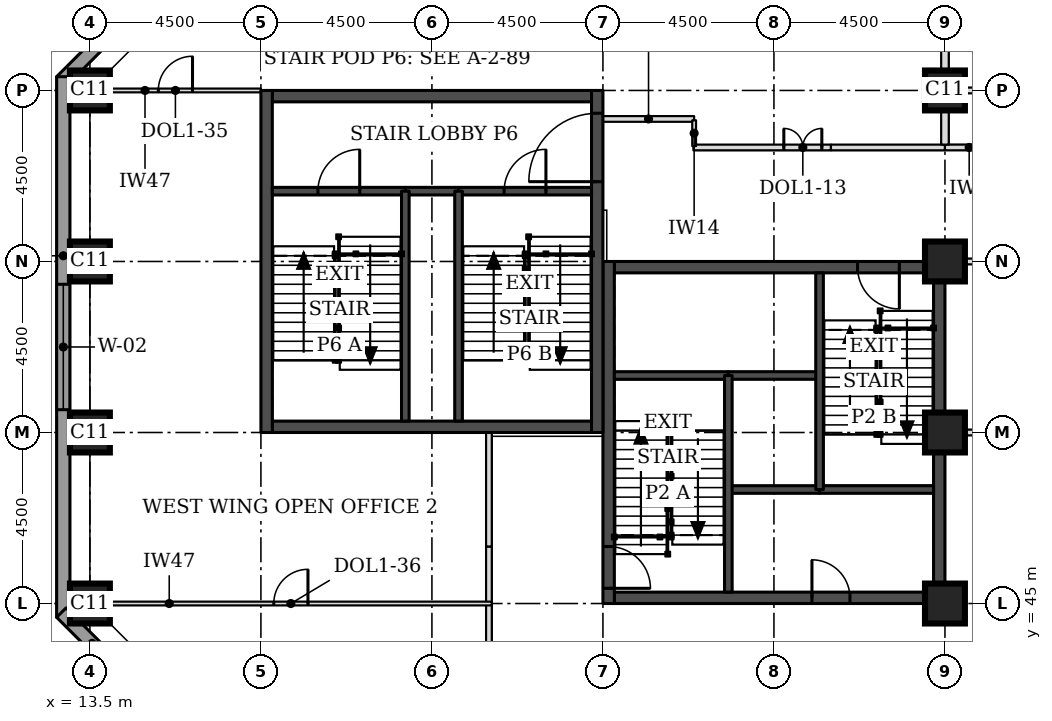
"""IFC4 building model, lengths in metres.
Left out: names, types, materials, properties, quantities, classifications, styles, units other than length and angle.
Written with IfcOpenShell. Run it as: python <this file> out.ifc"""

import sys

from ifc_helpers import new_model, si_unit, direction, frame, frame_2d, origin, origin_2d, place, context, subcontext, project, spatial, rectangle, extrude, element, fill, save


model = new_model("IFC4")
c1 = context("Model", 3, precision=1e-05, world=origin(), true_north=direction((0.0, 1.0)))
c2 = subcontext(c1, "Body", "Model", "MODEL_VIEW")
j1 = project(units=[si_unit("LENGTHUNIT", "METRE"), si_unit("PLANEANGLEUNIT", "RADIAN")], contexts=[c1])
p1 = place(None, origin())
s1 = spatial("IfcSite", under=j1, at=p1, CompositionType="ELEMENT")
p2 = place(p1, origin())
s2 = spatial("IfcBuilding", under=s1, at=p2, CompositionType="ELEMENT")
p3 = place(p2, frame((0.0, 0.0, 82.6)))
s3 = spatial("IfcBuildingStorey", under=s2, at=p3, CompositionType="ELEMENT", Elevation=82.6)
for number, where, z_axis, x_axis in (
    (1, (13.5, 45.0, 0.0), (0.0, 0.0, 1.0), (1.0, 0.0, 0.0)),
    (2, (36.0, 45.0, 0.0), (0.0, 0.0, 1.0), (1.0, 0.0, 0.0)),
    (3, (13.5, 49.5, 0.0), (0.0, 0.0, 1.0), (1.0, 0.0, 0.0)),
    (4, (36.0, 49.5, 0.0), (0.0, 0.0, 1.0), (1.0, 0.0, 0.0)),
    (5, (13.5, 54.0, 0.0), (0.0, 0.0, 1.0), (1.0, 0.0, 0.0)),
    (6, (36.0, 54.0, 0.0), (0.0, 0.0, 1.0), (1.0, 0.0, 0.0)),
    (7, (13.5, 58.5, 0.0), (0.0, 0.0, 1.0), (1.0, 0.0, 0.0)),
    (8, (36.0, 58.5, 0.0), (0.0, 0.0, 1.0), (1.0, 0.0, 0.0)),
):
    element("IfcColumn", number, at=place(p3, frame(where, z_axis=z_axis, x_axis=x_axis)), inside=s3, PredefinedType="COLUMN", context=c2, shape_type="SweptSolid", body=[
        extrude(rectangle(XDim=1.05, YDim=1.05, at=origin_2d()), origin(), (0.0, 0.0, 1.0), 3.7),
    ])
p4 = place(p3, frame((27.3, 45.15, 0.0), z_axis=(0.0, 0.0, 1.0), x_axis=(1.0, 0.0, 0.0)))
e9 = element("IfcWall", 9, at=p4, inside=s3, PredefinedType="SHEAR", context=c2, shape_type="SweptSolid", body=[
    extrude(rectangle(XDim=8.4, YDim=0.3, at=frame_2d((4.2, 0.0))), origin(), (0.0, 0.0, 1.0), 3.7),
])
p5 = place(p4, frame((5.2, 0.0, 0.0)))
e10 = element("IfcOpeningElement", 10, at=p5, cuts=e9, PredefinedType="OPENING", context=c2, shape_type="SweptSolid", body=[
    extrude(rectangle(XDim=1.0, YDim=2.1, at=frame_2d((0.5, 1.05))), frame((0.0, 0.16, 0.0), z_axis=(0.0, -1.0, 0.0), x_axis=(1.0, 0.0, 0.0)), (0.0, 0.0, 1.0), 0.32),
])
p6 = place(p3, frame((27.3, 53.85, 0.0), z_axis=(0.0, 0.0, 1.0), x_axis=(1.0, 0.0, 0.0)))
e11 = element("IfcWall", 11, at=p6, inside=s3, PredefinedType="SHEAR", context=c2, shape_type="SweptSolid", body=[
    extrude(rectangle(XDim=8.4, YDim=0.3, at=frame_2d((4.2, 0.0))), origin(), (0.0, 0.0, 1.0), 3.7),
])
p7 = place(p6, frame((6.4, 0.0, 0.0)))
e12 = element("IfcOpeningElement", 12, at=p7, cuts=e11, PredefinedType="OPENING", context=c2, shape_type="SweptSolid", body=[
    extrude(rectangle(XDim=1.1, YDim=2.1, at=frame_2d((0.55, 1.05))), frame((0.0, 0.16, 0.0), z_axis=(0.0, -1.0, 0.0), x_axis=(1.0, 0.0, 0.0)), (0.0, 0.0, 1.0), 0.32),
])
p8 = place(p3, frame((27.15, 45.0, 0.0), z_axis=(0.0, 0.0, 1.0), x_axis=(0.0, 1.0, 0.0)))
e13 = element("IfcWall", 13, at=p8, inside=s3, PredefinedType="SHEAR", context=c2, shape_type="SweptSolid", body=[
    extrude(rectangle(XDim=9.0, YDim=0.3, at=frame_2d((4.5, 0.0))), origin(), (0.0, 0.0, 1.0), 3.7),
])
p9 = place(p8, frame((0.4, 0.0, 0.0)))
e14 = element("IfcOpeningElement", 14, at=p9, cuts=e13, PredefinedType="OPENING", context=c2, shape_type="SweptSolid", body=[
    extrude(rectangle(XDim=1.1, YDim=2.1, at=frame_2d((0.55, 1.05))), frame((0.0, 0.16, 0.0), z_axis=(0.0, -1.0, 0.0), x_axis=(1.0, 0.0, 0.0)), (0.0, 0.0, 1.0), 0.32),
])
p10 = place(p3, frame((35.85, 45.0, 0.0), z_axis=(0.0, 0.0, 1.0), x_axis=(0.0, 1.0, 0.0)))
e15 = element("IfcWall", 15, at=p10, inside=s3, PredefinedType="SHEAR", context=c2, shape_type="SweptSolid", body=[
    extrude(rectangle(XDim=9.0, YDim=0.3, at=frame_2d((4.5, 0.0))), origin(), (0.0, 0.0, 1.0), 3.7),
])
for number, where, z_axis, x_axis in (
    (16, (18.3, 49.65, 0.0), (0.0, 0.0, 1.0), (1.0, 0.0, 0.0)),
    (17, (18.3, 58.35, 0.0), (0.0, 0.0, 1.0), (1.0, 0.0, 0.0)),
):
    element("IfcWall", number, at=place(p3, frame(where, z_axis=z_axis, x_axis=x_axis)), inside=s3, PredefinedType="SHEAR", context=c2, shape_type="SweptSolid", body=[
        extrude(rectangle(XDim=8.4, YDim=0.3, at=frame_2d((4.2, 0.0))), origin(), (0.0, 0.0, 1.0), 3.7),
    ])
p11 = place(p3, frame((18.15, 49.5, 0.0), z_axis=(0.0, 0.0, 1.0), x_axis=(0.0, 1.0, 0.0)))
e18 = element("IfcWall", 18, at=p11, inside=s3, PredefinedType="SHEAR", context=c2, shape_type="SweptSolid", body=[
    extrude(rectangle(XDim=9.0, YDim=0.3, at=frame_2d((4.5, 0.0))), origin(), (0.0, 0.0, 1.0), 3.7),
])
p12 = place(p3, frame((26.85, 49.5, 0.0), z_axis=(0.0, 0.0, 1.0), x_axis=(0.0, 1.0, 0.0)))
e19 = element("IfcWall", 19, at=p12, inside=s3, PredefinedType="SHEAR", context=c2, shape_type="SweptSolid", body=[
    extrude(rectangle(XDim=9.0, YDim=0.3, at=frame_2d((4.5, 0.0))), origin(), (0.0, 0.0, 1.0), 3.7),
])
p13 = place(p12, frame((6.6, 0.0, 0.0)))
e20 = element("IfcOpeningElement", 20, at=p13, cuts=e19, PredefinedType="OPENING", context=c2, shape_type="SweptSolid", body=[
    extrude(rectangle(XDim=1.8, YDim=2.1, at=frame_2d((0.9, 1.05))), frame((0.0, 0.16, 0.0), z_axis=(0.0, -1.0, 0.0), x_axis=(1.0, 0.0, 0.0)), (0.0, 0.0, 1.0), 0.32),
])
p14 = place(p3, frame((17.761, 63.751, 0.0), z_axis=(0.0, 0.0, 1.0), x_axis=(-0.707106781187, -0.707106781187, 0.0)))
e21 = element("IfcWall", 21, at=p14, inside=s3, PredefinedType="STANDARD", context=c2, shape_type="SweptSolid", body=[
    extrude(rectangle(XDim=7.089, YDim=0.35, at=frame_2d((3.544, 0.0))), origin(), (0.0, 0.0, 1.0), 3.525),
])
p15 = place(p14, frame((1.894, 0.0, 0.9)))
e22 = element("IfcOpeningElement", 22, at=p15, cuts=e21, PredefinedType="OPENING", context=c2, shape_type="SweptSolid", body=[
    extrude(rectangle(XDim=3.3, YDim=1.9, at=frame_2d((1.65, 0.95))), frame((0.0, 0.185, 0.0), z_axis=(0.0, -1.0, 0.0), x_axis=(1.0, 0.0, 0.0)), (0.0, 0.0, 1.0), 0.37),
])
p16 = place(p3, frame((12.8, 58.862, 0.0), z_axis=(0.0, 0.0, 1.0), x_axis=(0.0, -1.0, 0.0)))
e23 = element("IfcWall", 23, at=p16, inside=s3, PredefinedType="STANDARD", context=c2, shape_type="SweptSolid", body=[
    extrude(rectangle(XDim=14.225, YDim=0.35, at=frame_2d((7.112, 0.0))), origin(), (0.0, 0.0, 1.0), 3.525),
])
p17 = place(p16, frame((5.462, 0.0, 0.9)))
e24 = element("IfcOpeningElement", 24, at=p17, cuts=e23, PredefinedType="OPENING", context=c2, shape_type="SweptSolid", body=[
    extrude(rectangle(XDim=3.3, YDim=1.9, at=frame_2d((1.65, 0.95))), frame((0.0, 0.185, 0.0), z_axis=(0.0, -1.0, 0.0), x_axis=(1.0, 0.0, 0.0)), (0.0, 0.0, 1.0), 0.37),
])
p18 = place(p3, frame((12.749, 44.761, 0.0), z_axis=(0.0, 0.0, 1.0), x_axis=(0.707106781187, -0.707106781187, 0.0)))
e25 = element("IfcWall", 25, at=p18, inside=s3, PredefinedType="STANDARD", context=c2, shape_type="SweptSolid", body=[
    extrude(rectangle(XDim=7.089, YDim=0.35, at=frame_2d((3.544, 0.0))), origin(), (0.0, 0.0, 1.0), 3.525),
])
p19 = place(p18, frame((1.894, 0.0, 0.9)))
e26 = element("IfcOpeningElement", 26, at=p19, cuts=e25, PredefinedType="OPENING", context=c2, shape_type="SweptSolid", body=[
    extrude(rectangle(XDim=3.3, YDim=1.9, at=frame_2d((1.65, 0.95))), frame((0.0, 0.185, 0.0), z_axis=(0.0, -1.0, 0.0), x_axis=(1.0, 0.0, 0.0)), (0.0, 0.0, 1.0), 0.37),
])
for number, where, z_axis, x_axis in (
    (27, (36.525, 49.5, 0.0), (0.0, 0.0, 1.0), (1.0, 0.0, 0.0)),
    (28, (36.525, 54.0, 0.0), (0.0, 0.0, 1.0), (1.0, 0.0, 0.0)),
):
    element("IfcWall", number, at=place(p3, frame(where, z_axis=z_axis, x_axis=x_axis)), inside=s3, PredefinedType="PARTITIONING", context=c2, shape_type="SweptSolid", body=[
        extrude(rectangle(XDim=5.55, YDim=0.15, at=frame_2d((2.775, 0.0))), origin(), (0.0, 0.0, 1.0), 3.55),
    ])
p20 = place(p3, frame((29.38, 57.0, 0.0), z_axis=(0.0, 0.0, 1.0), x_axis=(1.0, 0.0, 0.0)))
e29 = element("IfcWall", 29, at=p20, inside=s3, PredefinedType="PARTITIONING", context=c2, shape_type="SweptSolid", body=[
    extrude(rectangle(XDim=3.62, YDim=0.15, at=frame_2d((1.81, 0.0))), origin(), (0.0, 0.0, 1.0), 3.55),
])
p21 = place(p20, frame((2.38, 0.0, 0.0)))
e30 = element("IfcOpeningElement", 30, at=p21, cuts=e29, PredefinedType="OPENING", context=c2, shape_type="SweptSolid", body=[
    extrude(rectangle(XDim=1.0, YDim=2.1, at=frame_2d((0.5, 1.05))), frame((0.0, 0.085, 0.0), z_axis=(0.0, -1.0, 0.0), x_axis=(1.0, 0.0, 0.0)), (0.0, 0.0, 1.0), 0.17),
])
p22 = place(p3, frame((33.0, 57.0, 0.0), z_axis=(0.0, 0.0, 1.0), x_axis=(1.0, 0.0, 0.0)))
e31 = element("IfcWall", 31, at=p22, inside=s3, PredefinedType="PARTITIONING", context=c2, shape_type="SweptSolid", body=[
    extrude(rectangle(XDim=3.0, YDim=0.15, at=frame_2d((1.5, 0.0))), origin(), (0.0, 0.0, 1.0), 3.55),
])
p23 = place(p3, frame((36.0, 57.0, 0.0), z_axis=(0.0, 0.0, 1.0), x_axis=(1.0, 0.0, 0.0)))
e32 = element("IfcWall", 32, at=p23, inside=s3, PredefinedType="PARTITIONING", context=c2, shape_type="SweptSolid", body=[
    extrude(rectangle(XDim=6.075, YDim=0.15, at=frame_2d((3.038, 0.0))), origin(), (0.0, 0.0, 1.0), 3.55),
])
p24 = place(p3, frame((36.525, 58.5, 0.0), z_axis=(0.0, 0.0, 1.0), x_axis=(1.0, 0.0, 0.0)))
e33 = element("IfcWall", 33, at=p24, inside=s3, PredefinedType="PARTITIONING", context=c2, shape_type="SweptSolid", body=[
    extrude(rectangle(XDim=2.55, YDim=0.15, at=frame_2d((1.275, 0.0))), origin(), (0.0, 0.0, 1.0), 3.55),
])
p25 = place(p3, frame((24.0, 39.975, 0.0), z_axis=(0.0, 0.0, 1.0), x_axis=(0.0, 1.0, 0.0)))
e34 = element("IfcWall", 34, at=p25, inside=s3, PredefinedType="PARTITIONING", context=c2, shape_type="SweptSolid", body=[
    extrude(rectangle(XDim=5.025, YDim=0.15, at=frame_2d((2.512, 0.0))), origin(), (0.0, 0.0, 1.0), 3.55),
])
p26 = place(p3, frame((24.0, 45.0, 0.0), z_axis=(0.0, 0.0, 1.0), x_axis=(0.0, 1.0, 0.0)))
e35 = element("IfcWall", 35, at=p26, inside=s3, PredefinedType="PARTITIONING", context=c2, shape_type="SweptSolid", body=[
    extrude(rectangle(XDim=1.5, YDim=0.15, at=frame_2d((0.75, 0.0))), origin(), (0.0, 0.0, 1.0), 3.55),
])
p27 = place(p3, frame((24.0, 46.5, 0.0), z_axis=(0.0, 0.0, 1.0), x_axis=(0.0, 1.0, 0.0)))
e36 = element("IfcWall", 36, at=p27, inside=s3, PredefinedType="PARTITIONING", context=c2, shape_type="SweptSolid", body=[
    extrude(rectangle(XDim=3.0, YDim=0.15, at=frame_2d((1.5, 0.0))), origin(), (0.0, 0.0, 1.0), 3.55),
])
p28 = place(p3, frame((36.0, 57.075, 0.0), z_axis=(0.0, 0.0, 1.0), x_axis=(0.0, 1.0, 0.0)))
e37 = element("IfcWall", 37, at=p28, inside=s3, PredefinedType="PARTITIONING", context=c2, shape_type="SweptSolid", body=[
    extrude(rectangle(XDim=0.9, YDim=0.2, at=frame_2d((0.45, 0.0))), origin(), (0.0, 0.0, 1.0), 2.8),
])
p29 = place(p3, frame((36.0, 58.995, 0.0), z_axis=(0.0, 0.0, 1.0), x_axis=(0.0, 1.0, 0.0)))
e38 = element("IfcWall", 38, at=p29, inside=s3, PredefinedType="PARTITIONING", context=c2, shape_type="SweptSolid", body=[
    extrude(rectangle(XDim=1.005, YDim=0.2, at=frame_2d((0.502, 0.0))), origin(), (0.0, 0.0, 1.0), 2.8),
])
p30 = place(p3, frame((13.5, 58.5, 0.0), z_axis=(0.0, 0.0, 1.0), x_axis=(1.0, 0.0, 0.0)))
e39 = element("IfcWall", 39, at=p30, inside=s3, PredefinedType="PARTITIONING", context=c2, shape_type="SweptSolid", body=[
    extrude(rectangle(XDim=4.5, YDim=0.1, at=frame_2d((2.25, 0.0))), origin(), (0.0, 0.0, 1.0), 2.55),
])
p31 = place(p30, frame((1.8, 0.0, 0.0)))
e40 = element("IfcOpeningElement", 40, at=p31, cuts=e39, PredefinedType="OPENING", context=c2, shape_type="SweptSolid", body=[
    extrude(rectangle(XDim=0.9, YDim=2.1, at=frame_2d((0.45, 1.05))), frame((0.0, 0.06, 0.0), z_axis=(0.0, -1.0, 0.0), x_axis=(1.0, 0.0, 0.0)), (0.0, 0.0, 1.0), 0.12),
])
p32 = place(p3, frame((24.075, 45.0, 0.0), z_axis=(0.0, 0.0, 1.0), x_axis=(-1.0, 0.0, 0.0)))
e41 = element("IfcWall", 41, at=p32, inside=s3, PredefinedType="PARTITIONING", context=c2, shape_type="SweptSolid", body=[
    extrude(rectangle(XDim=10.575, YDim=0.1, at=frame_2d((5.288, 0.0))), origin(), (0.0, 0.0, 1.0), 2.55),
])
p33 = place(p32, frame((4.837, 0.0, 0.0)))
e42 = element("IfcOpeningElement", 42, at=p33, cuts=e41, PredefinedType="OPENING", context=c2, shape_type="SweptSolid", body=[
    extrude(rectangle(XDim=0.9, YDim=2.1, at=frame_2d((0.45, 1.05))), frame((0.0, 0.06, 0.0), z_axis=(0.0, -1.0, 0.0), x_axis=(1.0, 0.0, 0.0)), (0.0, 0.0, 1.0), 0.12),
])
p34 = place(p3, frame((27.0, 57.75, 0.0), z_axis=(0.0, 0.0, 1.0), x_axis=(1.0, 0.0, 0.0)))
e43 = element("IfcWall", 43, at=p34, inside=s3, PredefinedType="PARTITIONING", context=c2, shape_type="SweptSolid", body=[
    extrude(rectangle(XDim=2.4, YDim=0.15, at=frame_2d((1.2, 0.0))), origin(), (0.0, 0.0, 1.0), 3.55),
])
p35 = place(p3, frame((29.4, 57.715, 0.0), z_axis=(0.0, 0.0, 1.0), x_axis=(0.0, -1.0, 0.0)))
e44 = element("IfcWall", 44, at=p35, inside=s3, PredefinedType="PARTITIONING", context=c2, shape_type="SweptSolid", body=[
    extrude(rectangle(XDim=0.68, YDim=0.1, at=frame_2d((0.34, 0.0))), origin(), (0.0, 0.0, 1.0), 3.55),
])
p36 = place(p3, frame((30.3, 48.0, 0.0), z_axis=(0.0, 0.0, 1.0), x_axis=(1.0, 0.0, 0.0)))
e45 = element("IfcWall", 45, at=p36, inside=s3, PredefinedType="SOLIDWALL", context=c2, shape_type="SweptSolid", body=[
    extrude(rectangle(XDim=2.4, YDim=0.2, at=frame_2d((1.2, 0.0))), origin(), (0.0, 0.0, 1.0), 3.55),
])
p37 = place(p3, frame((32.7, 48.0, 0.0), z_axis=(0.0, 0.0, 1.0), x_axis=(1.0, 0.0, 0.0)))
e46 = element("IfcWall", 46, at=p37, inside=s3, PredefinedType="SOLIDWALL", context=c2, shape_type="SweptSolid", body=[
    extrude(rectangle(XDim=3.0, YDim=0.2, at=frame_2d((1.5, 0.0))), origin(), (0.0, 0.0, 1.0), 3.55),
])
p38 = place(p3, frame((30.3, 51.0, 0.0), z_axis=(0.0, 0.0, 1.0), x_axis=(1.0, 0.0, 0.0)))
e47 = element("IfcWall", 47, at=p38, inside=s3, PredefinedType="SOLIDWALL", context=c2, shape_type="SweptSolid", body=[
    extrude(rectangle(XDim=2.4, YDim=0.2, at=frame_2d((1.2, 0.0))), origin(), (0.0, 0.0, 1.0), 3.7),
])
p39 = place(p3, frame((27.3, 51.0, 0.0), z_axis=(0.0, 0.0, 1.0), x_axis=(1.0, 0.0, 0.0)))
e48 = element("IfcWall", 48, at=p39, inside=s3, PredefinedType="SOLIDWALL", context=c2, shape_type="SweptSolid", body=[
    extrude(rectangle(XDim=3.0, YDim=0.2, at=frame_2d((1.5, 0.0))), origin(), (0.0, 0.0, 1.0), 3.55),
])
for number, where, z_axis, x_axis in (
    (49, (30.3, 45.3, 0.0), (0.0, 0.0, 1.0), (0.0, 1.0, 0.0)),
    (50, (32.7, 48.0, 0.0), (0.0, 0.0, 1.0), (0.0, 1.0, 0.0)),
):
    element("IfcWall", number, at=place(p3, frame(where, z_axis=z_axis, x_axis=x_axis)), inside=s3, PredefinedType="SOLIDWALL", context=c2, shape_type="SweptSolid", body=[
        extrude(rectangle(XDim=5.7, YDim=0.2, at=frame_2d((2.85, 0.0))), origin(), (0.0, 0.0, 1.0), 3.55),
    ])
p40 = place(p3, frame((21.8, 55.85, 0.0), z_axis=(0.0, 0.0, 1.0), x_axis=(1.0, 0.0, 0.0)))
e51 = element("IfcWall", 51, at=p40, inside=s3, PredefinedType="SOLIDWALL", context=c2, shape_type="SweptSolid", body=[
    extrude(rectangle(XDim=1.4, YDim=0.2, at=frame_2d((0.7, 0.0))), origin(), (0.0, 0.0, 1.0), 3.55),
])
p41 = place(p3, frame((18.3, 55.85, 0.0), z_axis=(0.0, 0.0, 1.0), x_axis=(1.0, 0.0, 0.0)))
e52 = element("IfcWall", 52, at=p41, inside=s3, PredefinedType="SOLIDWALL", context=c2, shape_type="SweptSolid", body=[
    extrude(rectangle(XDim=3.5, YDim=0.2, at=frame_2d((1.75, 0.0))), origin(), (0.0, 0.0, 1.0), 3.55),
])
p42 = place(p41, frame((1.2, 0.0, 0.0)))
e53 = element("IfcOpeningElement", 53, at=p42, cuts=e52, PredefinedType="OPENING", context=c2, shape_type="SweptSolid", body=[
    extrude(rectangle(XDim=1.1, YDim=2.1, at=frame_2d((0.55, 1.05))), frame((0.0, 0.11, 0.0), z_axis=(0.0, -1.0, 0.0), x_axis=(1.0, 0.0, 0.0)), (0.0, 0.0, 1.0), 0.22),
])
p43 = place(p3, frame((23.2, 55.85, 0.0), z_axis=(0.0, 0.0, 1.0), x_axis=(1.0, 0.0, 0.0)))
e54 = element("IfcWall", 54, at=p43, inside=s3, PredefinedType="SOLIDWALL", context=c2, shape_type="SweptSolid", body=[
    extrude(rectangle(XDim=3.5, YDim=0.2, at=frame_2d((1.75, 0.0))), origin(), (0.0, 0.0, 1.0), 3.55),
])
p44 = place(p43, frame((1.2, 0.0, 0.0)))
e55 = element("IfcOpeningElement", 55, at=p44, cuts=e54, PredefinedType="OPENING", context=c2, shape_type="SweptSolid", body=[
    extrude(rectangle(XDim=1.1, YDim=2.1, at=frame_2d((0.55, 1.05))), frame((0.0, 0.11, 0.0), z_axis=(0.0, -1.0, 0.0), x_axis=(1.0, 0.0, 0.0)), (0.0, 0.0, 1.0), 0.22),
])
for number, where, z_axis, x_axis in (
    (56, (21.8, 49.8, 0.0), (0.0, 0.0, 1.0), (0.0, 1.0, 0.0)),
    (57, (23.2, 49.8, 0.0), (0.0, 0.0, 1.0), (0.0, 1.0, 0.0)),
):
    element("IfcWall", number, at=place(p3, frame(where, z_axis=z_axis, x_axis=x_axis)), inside=s3, PredefinedType="SOLIDWALL", context=c2, shape_type="SweptSolid", body=[
        extrude(rectangle(XDim=6.05, YDim=0.2, at=frame_2d((3.025, 0.0))), origin(), (0.0, 0.0, 1.0), 3.55),
    ])
p45 = place(p17, origin())
e58 = element("IfcWindow", 58, at=p45, inside=s3, PartitioningType="SINGLE_PANEL", PredefinedType="WINDOW", context=c2, shape_type="SweptSolid", body=[
    extrude(rectangle(XDim=3.3, YDim=1.9, at=frame_2d((1.65, 0.95))), frame((0.0, 0.085, 0.0), z_axis=(0.0, -1.0, 0.0), x_axis=(1.0, 0.0, 0.0)), (0.0, 0.0, 1.0), 0.06),
])
fill(e24, e58)
p46 = place(p21, origin())
e59 = element("IfcDoor", 59, at=p46, inside=s3, OperationType="DOUBLE_DOOR_SINGLE_SWING", PredefinedType="DOOR", context=c2, shape_type="SweptSolid", body=[
    extrude(rectangle(XDim=1.0, YDim=2.1, at=frame_2d((0.5, 1.05))), frame((0.0, 0.025, 0.0), z_axis=(0.0, -1.0, 0.0), x_axis=(1.0, 0.0, 0.0)), (0.0, 0.0, 1.0), 0.05),
])
fill(e30, e59)
p47 = place(p31, origin())
e60 = element("IfcDoor", 60, at=p47, inside=s3, OperationType="SINGLE_SWING_RIGHT", PredefinedType="DOOR", context=c2, shape_type="SweptSolid", body=[
    extrude(rectangle(XDim=0.9, YDim=2.1, at=frame_2d((0.45, 1.05))), frame((0.0, 0.025, 0.0), z_axis=(0.0, -1.0, 0.0), x_axis=(1.0, 0.0, 0.0)), (0.0, 0.0, 1.0), 0.05),
])
fill(e40, e60)
p48 = place(p33, frame((0.9, 0.0, 0.0), z_axis=(0.0, 0.0, 1.0), x_axis=(-1.0, 0.0, 0.0)))
e61 = element("IfcDoor", 61, at=p48, inside=s3, OperationType="SINGLE_SWING_RIGHT", PredefinedType="DOOR", context=c2, shape_type="SweptSolid", body=[
    extrude(rectangle(XDim=0.9, YDim=2.1, at=frame_2d((0.45, 1.05))), frame((0.0, 0.025, 0.0), z_axis=(0.0, -1.0, 0.0), x_axis=(1.0, 0.0, 0.0)), (0.0, 0.0, 1.0), 0.05),
])
fill(e42, e61)
p49 = place(p9, frame((1.1, 0.0, 0.0), z_axis=(0.0, 0.0, 1.0), x_axis=(-1.0, 0.0, 0.0)))
e62 = element("IfcDoor", 62, at=p49, inside=s3, OperationType="SINGLE_SWING_RIGHT", PredefinedType="DOOR", context=c2, shape_type="SweptSolid", body=[
    extrude(rectangle(XDim=1.1, YDim=2.1, at=frame_2d((0.55, 1.05))), frame((0.0, 0.025, 0.0), z_axis=(0.0, -1.0, 0.0), x_axis=(1.0, 0.0, 0.0)), (0.0, 0.0, 1.0), 0.05),
])
fill(e14, e62)
p50 = place(p7, frame((1.1, 0.0, 0.0), z_axis=(0.0, 0.0, 1.0), x_axis=(-1.0, 0.0, 0.0)))
e63 = element("IfcDoor", 63, at=p50, inside=s3, OperationType="SINGLE_SWING_LEFT", PredefinedType="DOOR", context=c2, shape_type="SweptSolid", body=[
    extrude(rectangle(XDim=1.1, YDim=2.1, at=frame_2d((0.55, 1.05))), frame((0.0, 0.025, 0.0), z_axis=(0.0, -1.0, 0.0), x_axis=(1.0, 0.0, 0.0)), (0.0, 0.0, 1.0), 0.05),
])
fill(e12, e63)
p51 = place(p5, origin())
e64 = element("IfcDoor", 64, at=p51, inside=s3, OperationType="SINGLE_SWING_LEFT", PredefinedType="DOOR", context=c2, shape_type="SweptSolid", body=[
    extrude(rectangle(XDim=1.0, YDim=2.1, at=frame_2d((0.5, 1.05))), frame((0.0, 0.025, 0.0), z_axis=(0.0, -1.0, 0.0), x_axis=(1.0, 0.0, 0.0)), (0.0, 0.0, 1.0), 0.05),
])
fill(e10, e64)
p52 = place(p42, origin())
e65 = element("IfcDoor", 65, at=p52, inside=s3, OperationType="SINGLE_SWING_RIGHT", PredefinedType="DOOR", context=c2, shape_type="SweptSolid", body=[
    extrude(rectangle(XDim=1.1, YDim=2.1, at=frame_2d((0.55, 1.05))), frame((0.0, 0.025, 0.0), z_axis=(0.0, -1.0, 0.0), x_axis=(1.0, 0.0, 0.0)), (0.0, 0.0, 1.0), 0.05),
])
fill(e53, e65)
p53 = place(p44, origin())
e66 = element("IfcDoor", 66, at=p53, inside=s3, OperationType="SINGLE_SWING_RIGHT", PredefinedType="DOOR", context=c2, shape_type="SweptSolid", body=[
    extrude(rectangle(XDim=1.1, YDim=2.1, at=frame_2d((0.55, 1.05))), frame((0.0, 0.025, 0.0), z_axis=(0.0, -1.0, 0.0), x_axis=(1.0, 0.0, 0.0)), (0.0, 0.0, 1.0), 0.05),
])
fill(e55, e66)
p54 = place(p13, origin())
e67 = element("IfcDoor", 67, at=p54, inside=s3, OperationType="SINGLE_SWING_LEFT", PredefinedType="DOOR", context=c2, shape_type="SweptSolid", body=[
    extrude(rectangle(XDim=1.8, YDim=2.1, at=frame_2d((0.9, 1.05))), frame((0.0, 0.025, 0.0), z_axis=(0.0, -1.0, 0.0), x_axis=(1.0, 0.0, 0.0)), (0.0, 0.0, 1.0), 0.05),
])
fill(e20, e67)
save(model, sys.argv[1])
